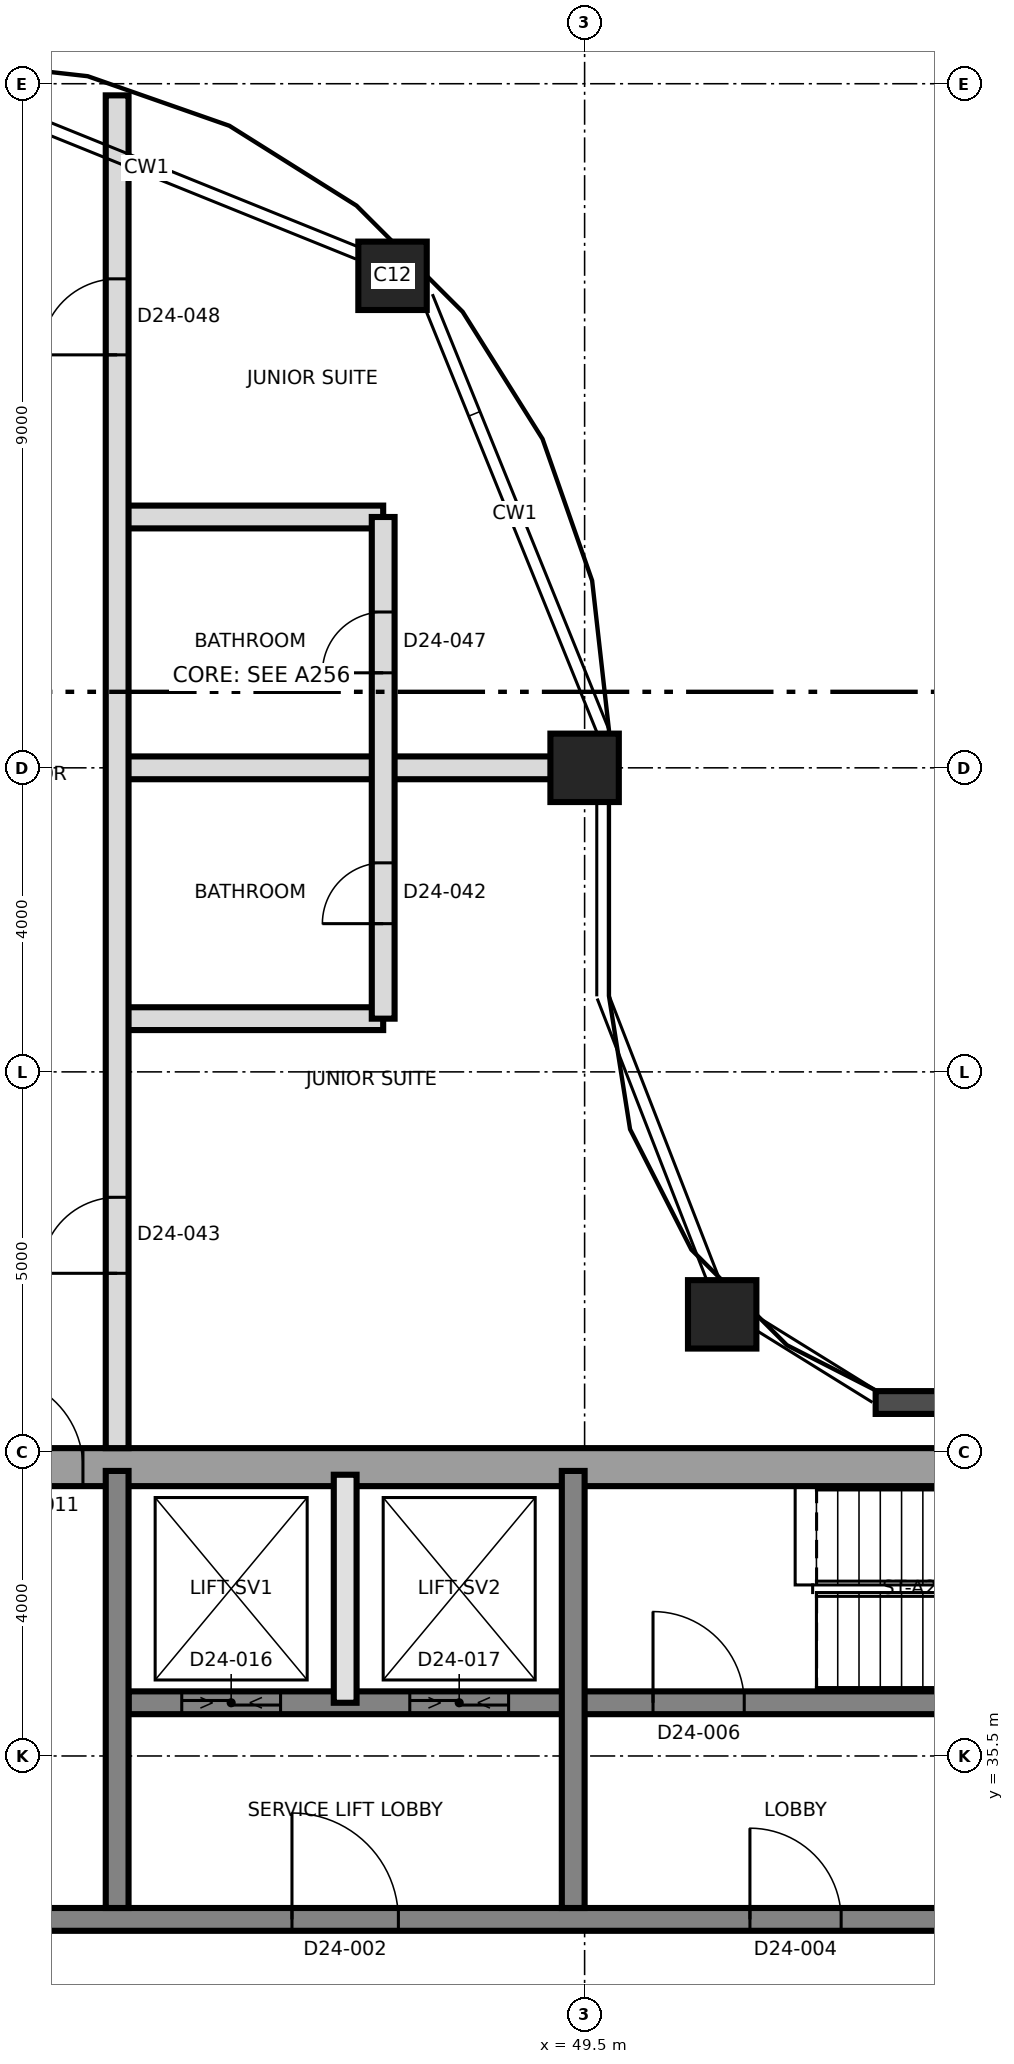
"""IFC4 building model, lengths in metres.
Left out: names, types, materials, properties, quantities, classifications, styles, units other than length and angle.
Written with IfcOpenShell. Run it as: python <this file> out.ifc"""

import sys

from ifc_helpers import new_model, si_unit, direction, frame, frame_2d, origin, origin_2d, place, context, subcontext, project, spatial, rectangle, extrude, element, fill, save


model = new_model("IFC4")
c1 = context("Model", 3, precision=1e-05, world=origin(), true_north=direction((0.0, 1.0)))
c2 = subcontext(c1, "Body", "Model", "MODEL_VIEW")
j1 = project(units=[si_unit("LENGTHUNIT", "METRE"), si_unit("PLANEANGLEUNIT", "RADIAN")], contexts=[c1])
p1 = place(None, origin())
s1 = spatial("IfcSite", under=j1, at=p1, CompositionType="ELEMENT")
p2 = place(p1, origin())
s2 = spatial("IfcBuilding", under=s1, at=p2, CompositionType="ELEMENT")
p3 = place(p2, frame((0.0, 0.0, 214.3)))
s3 = spatial("IfcBuildingStorey", under=s2, at=p3, CompositionType="ELEMENT", Elevation=214.3)
p4 = place(p3, frame((31.25, 39.3, 0.0), z_axis=(0.0, 0.0, 1.0), x_axis=(1.0, 0.0, 0.0)))
e1 = element("IfcWall", 1, at=p4, inside=s3, PredefinedType="SHEAR", context=c2, shape_type="SweptSolid", body=[
    extrude(rectangle(XDim=27.0, YDim=0.5, at=frame_2d((13.5, 0.0))), origin(), (0.0, 0.0, 1.0), 3.7),
])
p5 = place(p4, frame((10.45, 0.0, 0.0)))
e2 = element("IfcOpeningElement", 2, at=p5, cuts=e1, PredefinedType="OPENING", context=c2, shape_type="SweptSolid", body=[
    extrude(rectangle(XDim=1.2, YDim=2.1, at=frame_2d((0.6, 1.05))), frame((0.0, 0.26, 0.0), z_axis=(0.0, -1.0, 0.0), x_axis=(1.0, 0.0, 0.0)), (0.0, 0.0, 1.0), 0.52),
])
p6 = place(p3, frame((31.75, 33.35, 0.0), z_axis=(0.0, 0.0, 1.0), x_axis=(1.0, 0.0, 0.0)))
e3 = element("IfcWall", 3, at=p6, inside=s3, PredefinedType="SHEAR", context=c2, shape_type="SweptSolid", body=[
    extrude(rectangle(XDim=26.5, YDim=0.3, at=frame_2d((13.25, 0.0))), origin(), (0.0, 0.0, 1.0), 3.7),
])
p7 = place(p6, frame((13.9, 0.0, 0.0)))
e4 = element("IfcOpeningElement", 4, at=p7, cuts=e3, PredefinedType="OPENING", context=c2, shape_type="SweptSolid", body=[
    extrude(rectangle(XDim=1.4, YDim=2.1, at=frame_2d((0.7, 1.05))), frame((0.0, 0.16, 0.0), z_axis=(0.0, -1.0, 0.0), x_axis=(1.0, 0.0, 0.0)), (0.0, 0.0, 1.0), 0.32),
])
p8 = place(p6, frame((5.375, 0.0, 0.0)))
e5 = element("IfcOpeningElement", 5, at=p8, cuts=e3, PredefinedType="OPENING", context=c2, shape_type="SweptSolid", body=[
    extrude(rectangle(XDim=1.2, YDim=2.1, at=frame_2d((0.6, 1.05))), frame((0.0, 0.16, 0.0), z_axis=(0.0, -1.0, 0.0), x_axis=(1.0, 0.0, 0.0)), (0.0, 0.0, 1.0), 0.32),
])
p9 = place(p6, frame((19.925, 0.0, 0.0)))
e6 = element("IfcOpeningElement", 6, at=p9, cuts=e3, PredefinedType="OPENING", context=c2, shape_type="SweptSolid", body=[
    extrude(rectangle(XDim=1.2, YDim=2.1, at=frame_2d((0.6, 1.05))), frame((0.0, 0.16, 0.0), z_axis=(0.0, -1.0, 0.0), x_axis=(1.0, 0.0, 0.0)), (0.0, 0.0, 1.0), 0.32),
])
p10 = place(p3, frame((43.5, 36.2, 0.0), z_axis=(0.0, 0.0, 1.0), x_axis=(1.0, 0.0, 0.0)))
e7 = element("IfcWall", 7, at=p10, inside=s3, PredefinedType="SHEAR", context=c2, shape_type="SweptSolid", body=[
    extrude(rectangle(XDim=14.75, YDim=0.3, at=frame_2d((7.375, 0.0))), origin(), (0.0, 0.0, 1.0), 3.7),
])
p11 = place(p10, frame((6.9, 0.0, 0.0)))
e8 = element("IfcOpeningElement", 8, at=p11, cuts=e7, PredefinedType="OPENING", context=c2, shape_type="SweptSolid", body=[
    extrude(rectangle(XDim=1.2, YDim=2.1, at=frame_2d((0.6, 1.05))), frame((0.0, 0.16, 0.0), z_axis=(0.0, -1.0, 0.0), x_axis=(1.0, 0.0, 0.0)), (0.0, 0.0, 1.0), 0.32),
])
p12 = place(p10, frame((0.7, 0.0, 0.0)))
e9 = element("IfcOpeningElement", 9, at=p12, cuts=e7, PredefinedType="OPENING", context=c2, shape_type="SweptSolid", body=[
    extrude(rectangle(XDim=1.3, YDim=2.4, at=frame_2d((0.65, 1.2))), frame((0.0, 0.16, 0.0), z_axis=(0.0, -1.0, 0.0), x_axis=(1.0, 0.0, 0.0)), (0.0, 0.0, 1.0), 0.32),
])
p13 = place(p10, frame((3.7, 0.0, 0.0)))
e10 = element("IfcOpeningElement", 10, at=p13, cuts=e7, PredefinedType="OPENING", context=c2, shape_type="SweptSolid", body=[
    extrude(rectangle(XDim=1.3, YDim=2.4, at=frame_2d((0.65, 1.2))), frame((0.0, 0.16, 0.0), z_axis=(0.0, -1.0, 0.0), x_axis=(1.0, 0.0, 0.0)), (0.0, 0.0, 1.0), 0.32),
])
for number, where, z_axis, x_axis in (
    (11, (43.35, 33.5, 0.0), (0.0, 0.0, 1.0), (0.0, 1.0, 0.0)),
    (12, (49.35, 33.5, 0.0), (0.0, 0.0, 1.0), (0.0, 1.0, 0.0)),
):
    element("IfcWall", number, at=place(p3, frame(where, z_axis=z_axis, x_axis=x_axis)), inside=s3, PredefinedType="SHEAR", context=c2, shape_type="SweptSolid", body=[
        extrude(rectangle(XDim=5.75, YDim=0.3, at=frame_2d((2.875, 0.0))), origin(), (0.0, 0.0, 1.0), 3.7),
    ])
for number, where, z_axis, x_axis in (
    (13, (51.31, 41.31, 0.0), (0.0, 0.0, 1.0), (1.0, 0.0, 0.0)),
    (14, (49.5, 48.5, 0.0), (0.0, 0.0, 1.0), (1.0, 0.0, 0.0)),
    (15, (46.973, 54.973, 0.0), (0.0, 0.0, 1.0), (1.0, 0.0, 0.0)),
):
    element("IfcColumn", number, at=place(p3, frame(where, z_axis=z_axis, x_axis=x_axis)), inside=s3, PredefinedType="COLUMN", context=c2, shape_type="SweptSolid", body=[
        extrude(rectangle(XDim=0.9, YDim=0.9, at=origin_2d()), origin(), (0.0, 0.0, 1.0), 3.7),
    ])
p14 = place(p3, frame((58.67, 40.15, 0.0), z_axis=(0.0, 0.0, 1.0), x_axis=(-1.0, 0.0, 0.0)))
e16 = element("IfcWall", 16, at=p14, inside=s3, PredefinedType="SOLIDWALL", context=c2, shape_type="SweptSolid", body=[
    extrude(rectangle(XDim=5.341, YDim=0.3, at=frame_2d((2.67, 0.0))), origin(), (0.0, 0.0, 1.0), 3.4),
])
p15 = place(p3, frame((46.35, 36.2, 0.0), z_axis=(0.0, 0.0, 1.0), x_axis=(0.0, 1.0, 0.0)))
e17 = element("IfcWall", 17, at=p15, inside=s3, PredefinedType="SOLIDWALL", context=c2, shape_type="SweptSolid", body=[
    extrude(rectangle(XDim=3.0, YDim=0.3, at=frame_2d((1.5, 0.0))), origin(), (0.0, 0.0, 1.0), 3.4),
])
p16 = place(p3, frame((43.35, 45.2, 0.0), z_axis=(0.0, 0.0, 1.0), x_axis=(1.0, 0.0, 0.0)))
e18 = element("IfcWall", 18, at=p16, inside=s3, PredefinedType="PARTITIONING", context=c2, shape_type="SweptSolid", body=[
    extrude(rectangle(XDim=3.5, YDim=0.3, at=frame_2d((1.75, 0.0))), origin(), (0.0, 0.0, 1.0), 3.4),
])
p17 = place(p3, frame((43.35, 48.5, 0.0), z_axis=(0.0, 0.0, 1.0), x_axis=(1.0, 0.0, 0.0)))
e19 = element("IfcWall", 19, at=p17, inside=s3, PredefinedType="PARTITIONING", context=c2, shape_type="SweptSolid", body=[
    extrude(rectangle(XDim=6.12, YDim=0.3, at=frame_2d((3.06, 0.0))), origin(), (0.0, 0.0, 1.0), 3.4),
])
p18 = place(p3, frame((43.35, 51.8, 0.0), z_axis=(0.0, 0.0, 1.0), x_axis=(1.0, 0.0, 0.0)))
e20 = element("IfcWall", 20, at=p18, inside=s3, PredefinedType="PARTITIONING", context=c2, shape_type="SweptSolid", body=[
    extrude(rectangle(XDim=3.5, YDim=0.3, at=frame_2d((1.75, 0.0))), origin(), (0.0, 0.0, 1.0), 3.4),
])
p19 = place(p3, frame((43.35, 39.55, 0.0), z_axis=(0.0, 0.0, 1.0), x_axis=(0.0, 1.0, 0.0)))
e21 = element("IfcWall", 21, at=p19, inside=s3, PredefinedType="PARTITIONING", context=c2, shape_type="SweptSolid", body=[
    extrude(rectangle(XDim=17.797, YDim=0.3, at=frame_2d((8.898, 0.0))), origin(), (0.0, 0.0, 1.0), 3.4),
])
p20 = place(p19, frame((2.3, 0.0, 0.0)))
e22 = element("IfcOpeningElement", 22, at=p20, cuts=e21, PredefinedType="OPENING", context=c2, shape_type="SweptSolid", body=[
    extrude(rectangle(XDim=1.0, YDim=2.4, at=frame_2d((0.5, 1.2))), frame((0.0, 0.16, 0.0), z_axis=(0.0, -1.0, 0.0), x_axis=(1.0, 0.0, 0.0)), (0.0, 0.0, 1.0), 0.32),
])
p21 = place(p19, frame((14.383, 0.0, 0.0)))
e23 = element("IfcOpeningElement", 23, at=p21, cuts=e21, PredefinedType="OPENING", context=c2, shape_type="SweptSolid", body=[
    extrude(rectangle(XDim=1.0, YDim=2.4, at=frame_2d((0.5, 1.2))), frame((0.0, 0.16, 0.0), z_axis=(0.0, -1.0, 0.0), x_axis=(1.0, 0.0, 0.0)), (0.0, 0.0, 1.0), 0.32),
])
p22 = place(p3, frame((46.85, 45.2, 0.0), z_axis=(0.0, 0.0, 1.0), x_axis=(0.0, 1.0, 0.0)))
e24 = element("IfcWall", 24, at=p22, inside=s3, PredefinedType="PARTITIONING", context=c2, shape_type="SweptSolid", body=[
    extrude(rectangle(XDim=6.6, YDim=0.3, at=frame_2d((3.3, 0.0))), origin(), (0.0, 0.0, 1.0), 3.4),
])
p23 = place(p22, frame((1.25, 0.0, 0.0)))
e25 = element("IfcOpeningElement", 25, at=p23, cuts=e24, PredefinedType="OPENING", context=c2, shape_type="SweptSolid", body=[
    extrude(rectangle(XDim=0.8, YDim=2.1, at=frame_2d((0.4, 1.05))), frame((0.0, 0.16, 0.0), z_axis=(0.0, -1.0, 0.0), x_axis=(1.0, 0.0, 0.0)), (0.0, 0.0, 1.0), 0.32),
])
p24 = place(p22, frame((4.55, 0.0, 0.0)))
e26 = element("IfcOpeningElement", 26, at=p24, cuts=e24, PredefinedType="OPENING", context=c2, shape_type="SweptSolid", body=[
    extrude(rectangle(XDim=0.8, YDim=2.1, at=frame_2d((0.4, 1.05))), frame((0.0, 0.16, 0.0), z_axis=(0.0, -1.0, 0.0), x_axis=(1.0, 0.0, 0.0)), (0.0, 0.0, 1.0), 0.32),
])
p25 = place(p7, origin())
e27 = element("IfcDoor", 27, at=p25, inside=s3, OperationType="SINGLE_SWING_RIGHT", PredefinedType="DOOR", context=c2, shape_type="SweptSolid", body=[
    extrude(rectangle(XDim=1.4, YDim=2.1, at=frame_2d((0.7, 1.05))), frame((0.0, 0.025, 0.0), z_axis=(0.0, -1.0, 0.0), x_axis=(1.0, 0.0, 0.0)), (0.0, 0.0, 1.0), 0.05),
])
fill(e4, e27)
p26 = place(p9, origin())
e28 = element("IfcDoor", 28, at=p26, inside=s3, OperationType="SINGLE_SWING_RIGHT", PredefinedType="DOOR", context=c2, shape_type="SweptSolid", body=[
    extrude(rectangle(XDim=1.2, YDim=2.1, at=frame_2d((0.6, 1.05))), frame((0.0, 0.025, 0.0), z_axis=(0.0, -1.0, 0.0), x_axis=(1.0, 0.0, 0.0)), (0.0, 0.0, 1.0), 0.05),
])
fill(e6, e28)
p27 = place(p11, origin())
e29 = element("IfcDoor", 29, at=p27, inside=s3, OperationType="SINGLE_SWING_LEFT", PredefinedType="DOOR", context=c2, shape_type="SweptSolid", body=[
    extrude(rectangle(XDim=1.2, YDim=2.1, at=frame_2d((0.6, 1.05))), frame((0.0, 0.025, 0.0), z_axis=(0.0, -1.0, 0.0), x_axis=(1.0, 0.0, 0.0)), (0.0, 0.0, 1.0), 0.05),
])
fill(e8, e29)
p28 = place(p5, origin())
e30 = element("IfcDoor", 30, at=p28, inside=s3, OperationType="SINGLE_SWING_RIGHT", PredefinedType="DOOR", context=c2, shape_type="SweptSolid", body=[
    extrude(rectangle(XDim=1.2, YDim=2.1, at=frame_2d((0.6, 1.05))), frame((0.0, 0.025, 0.0), z_axis=(0.0, -1.0, 0.0), x_axis=(1.0, 0.0, 0.0)), (0.0, 0.0, 1.0), 0.05),
])
fill(e2, e30)
p29 = place(p12, origin())
e31 = element("IfcDoor", 31, at=p29, inside=s3, OperationType="SLIDING_TO_LEFT", PredefinedType="DOOR", context=c2, shape_type="SweptSolid", body=[
    extrude(rectangle(XDim=1.3, YDim=2.4, at=frame_2d((0.65, 1.2))), frame((0.0, 0.025, 0.0), z_axis=(0.0, -1.0, 0.0), x_axis=(1.0, 0.0, 0.0)), (0.0, 0.0, 1.0), 0.05),
])
fill(e9, e31)
p30 = place(p13, origin())
e32 = element("IfcDoor", 32, at=p30, inside=s3, OperationType="SLIDING_TO_LEFT", PredefinedType="DOOR", context=c2, shape_type="SweptSolid", body=[
    extrude(rectangle(XDim=1.3, YDim=2.4, at=frame_2d((0.65, 1.2))), frame((0.0, 0.025, 0.0), z_axis=(0.0, -1.0, 0.0), x_axis=(1.0, 0.0, 0.0)), (0.0, 0.0, 1.0), 0.05),
])
fill(e10, e32)
p31 = place(p23, origin())
e33 = element("IfcDoor", 33, at=p31, inside=s3, OperationType="SINGLE_SWING_LEFT", PredefinedType="DOOR", context=c2, shape_type="SweptSolid", body=[
    extrude(rectangle(XDim=0.8, YDim=2.1, at=frame_2d((0.4, 1.05))), frame((0.0, 0.025, 0.0), z_axis=(0.0, -1.0, 0.0), x_axis=(1.0, 0.0, 0.0)), (0.0, 0.0, 1.0), 0.05),
])
fill(e25, e33)
p32 = place(p20, origin())
e34 = element("IfcDoor", 34, at=p32, inside=s3, OperationType="SINGLE_SWING_RIGHT", PredefinedType="DOOR", context=c2, shape_type="SweptSolid", body=[
    extrude(rectangle(XDim=1.0, YDim=2.4, at=frame_2d((0.5, 1.2))), frame((0.0, 0.025, 0.0), z_axis=(0.0, -1.0, 0.0), x_axis=(1.0, 0.0, 0.0)), (0.0, 0.0, 1.0), 0.05),
])
fill(e22, e34)
p33 = place(p24, origin())
e35 = element("IfcDoor", 35, at=p33, inside=s3, OperationType="SINGLE_SWING_RIGHT", PredefinedType="DOOR", context=c2, shape_type="SweptSolid", body=[
    extrude(rectangle(XDim=0.8, YDim=2.1, at=frame_2d((0.4, 1.05))), frame((0.0, 0.025, 0.0), z_axis=(0.0, -1.0, 0.0), x_axis=(1.0, 0.0, 0.0)), (0.0, 0.0, 1.0), 0.05),
])
fill(e26, e35)
p34 = place(p21, origin())
e36 = element("IfcDoor", 36, at=p34, inside=s3, OperationType="SINGLE_SWING_LEFT", PredefinedType="DOOR", context=c2, shape_type="SweptSolid", body=[
    extrude(rectangle(XDim=1.0, YDim=2.4, at=frame_2d((0.5, 1.2))), frame((0.0, 0.025, 0.0), z_axis=(0.0, -1.0, 0.0), x_axis=(1.0, 0.0, 0.0)), (0.0, 0.0, 1.0), 0.05),
])
fill(e23, e36)
save(model, sys.argv[1])
